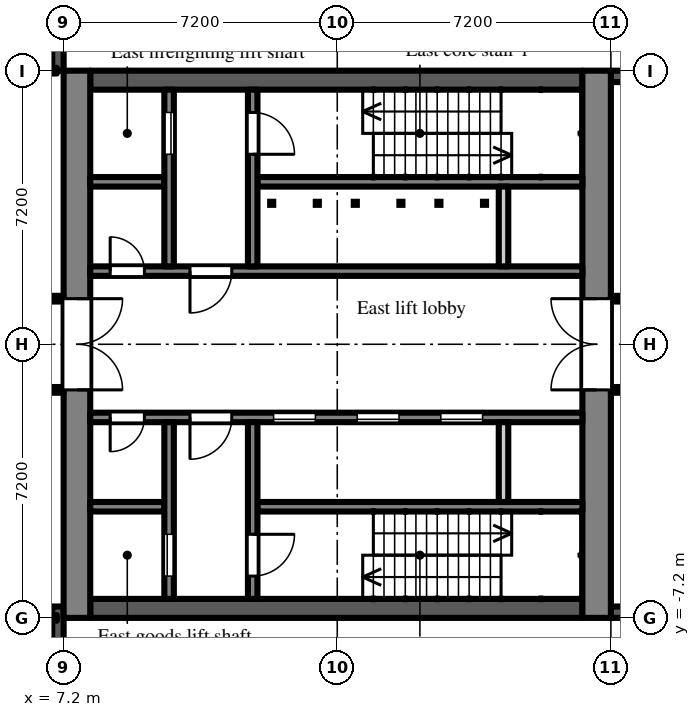
"""IFC4 building model, lengths in metres.
Left out: names, types, materials, properties, quantities, classifications, styles, units other than length and angle.
Written with IfcOpenShell. Run it as: python <this file> out.ifc"""

import sys

from ifc_helpers import new_model, si_unit, direction, frame, frame_2d, origin, place, context, subcontext, project, spatial, rectangle, extrude, element, fill, save


model = new_model("IFC4")
c1 = context("Model", 3, precision=1e-05, world=origin(), true_north=direction((0.0, 1.0)))
c2 = subcontext(c1, "Body", "Model", "MODEL_VIEW")
j1 = project(units=[si_unit("LENGTHUNIT", "METRE"), si_unit("PLANEANGLEUNIT", "RADIAN")], contexts=[c1])
p1 = place(None, origin())
s1 = spatial("IfcSite", under=j1, at=p1, CompositionType="ELEMENT")
p2 = place(p1, origin())
s2 = spatial("IfcBuilding", under=s1, at=p2, CompositionType="ELEMENT")
p3 = place(p2, frame((0.0, 0.0, 111.9)))
s3 = spatial("IfcBuildingStorey", under=s2, at=p3, CompositionType="ELEMENT", Elevation=111.9)
for number, where, z_axis, x_axis in (
    (1, (21.6, -7.05, 0.0), (0.0, 0.0, 1.0), (1.0, 0.0, 0.0)),
    (2, (24.3, 7.05, 0.0), (0.0, 0.0, 1.0), (-1.0, 0.0, 0.0)),
):
    element("IfcWall", number, at=place(p3, frame(where, z_axis=z_axis, x_axis=x_axis)), inside=s3, PredefinedType="SOLIDWALL", context=c2, shape_type="SweptSolid", body=[
        extrude(rectangle(XDim=2.7, YDim=0.3, at=frame_2d((1.35, 0.0))), origin(), (0.0, 0.0, 1.0), 3.4),
    ])
p4 = place(p3, frame((7.05, 7.2, 0.0), z_axis=(0.0, 0.0, 1.0), x_axis=(0.0, 1.0, 0.0)))
e3 = element("IfcWall", 3, at=p4, inside=s3, PredefinedType="SOLIDWALL", context=c2, shape_type="SweptSolid", body=[
    extrude(rectangle(XDim=7.2, YDim=0.3, at=frame_2d((3.6, 0.0))), origin(), (0.0, 0.0, 1.0), 3.8),
])
p5 = place(p3, frame((7.05, -14.4, 0.0), z_axis=(0.0, 0.0, 1.0), x_axis=(0.0, 1.0, 0.0)))
e4 = element("IfcWall", 4, at=p5, inside=s3, PredefinedType="SOLIDWALL", context=c2, shape_type="SweptSolid", body=[
    extrude(rectangle(XDim=7.5, YDim=0.3, at=frame_2d((3.75, 0.0))), origin(), (0.0, 0.0, 1.0), 3.8),
])
p6 = place(p3, frame((7.55, -7.2, 0.0), z_axis=(0.0, 0.0, 1.0), x_axis=(0.0, 1.0, 0.0)))
e5 = element("IfcWall", 5, at=p6, inside=s3, PredefinedType="SHEAR", context=c2, shape_type="SweptSolid", body=[
    extrude(rectangle(XDim=14.4, YDim=0.7, at=frame_2d((7.2, 0.0))), origin(), (0.0, 0.0, 1.0), 3.8),
])
p7 = place(p6, frame((6.0, 0.0, 0.0)))
e6 = element("IfcOpeningElement", 6, at=p7, cuts=e5, PredefinedType="OPENING", context=c2, shape_type="SweptSolid", body=[
    extrude(rectangle(XDim=2.4, YDim=2.2, at=frame_2d((1.2, 1.1))), frame((0.0, 0.36, 0.0), z_axis=(0.0, -1.0, 0.0), x_axis=(1.0, 0.0, 0.0)), (0.0, 0.0, 1.0), 0.72),
])
p8 = place(p3, frame((21.225, -7.2, 0.0), z_axis=(0.0, 0.0, 1.0), x_axis=(0.0, 1.0, 0.0)))
e7 = element("IfcWall", 7, at=p8, inside=s3, PredefinedType="SHEAR", context=c2, shape_type="SweptSolid", body=[
    extrude(rectangle(XDim=14.4, YDim=0.75, at=frame_2d((7.2, 0.0))), origin(), (0.0, 0.0, 1.0), 3.8),
])
p9 = place(p8, frame((6.0, 0.0, 0.0)))
e8 = element("IfcOpeningElement", 8, at=p9, cuts=e7, PredefinedType="OPENING", context=c2, shape_type="SweptSolid", body=[
    extrude(rectangle(XDim=2.4, YDim=2.2, at=frame_2d((1.2, 1.1))), frame((0.0, 0.385, 0.0), z_axis=(0.0, -1.0, 0.0), x_axis=(1.0, 0.0, 0.0)), (0.0, 0.0, 1.0), 0.77),
])
p10 = place(p3, frame((7.9, 6.95, 0.0), z_axis=(0.0, 0.0, 1.0), x_axis=(1.0, 0.0, 0.0)))
e9 = element("IfcWall", 9, at=p10, inside=s3, PredefinedType="SHEAR", context=c2, shape_type="SweptSolid", body=[
    extrude(rectangle(XDim=12.95, YDim=0.5, at=frame_2d((6.475, 0.0))), origin(), (0.0, 0.0, 1.0), 3.8),
])
p11 = place(p3, frame((7.9, 1.925, 0.0), z_axis=(0.0, 0.0, 1.0), x_axis=(1.0, 0.0, 0.0)))
e10 = element("IfcWall", 10, at=p11, inside=s3, PredefinedType="SHEAR", context=c2, shape_type="SweptSolid", body=[
    extrude(rectangle(XDim=12.95, YDim=0.25, at=frame_2d((6.475, 0.0))), origin(), (0.0, 0.0, 1.0), 3.8),
])
p12 = place(p11, frame((0.525, 0.0, 0.0)))
e11 = element("IfcOpeningElement", 11, at=p12, cuts=e10, PredefinedType="OPENING", context=c2, shape_type="SweptSolid", body=[
    extrude(rectangle(XDim=0.9, YDim=2.1, at=frame_2d((0.45, 1.05))), frame((0.0, 0.135, 0.0), z_axis=(0.0, -1.0, 0.0), x_axis=(1.0, 0.0, 0.0)), (0.0, 0.0, 1.0), 0.27),
])
p13 = place(p11, frame((2.625, 0.0, 0.0)))
e12 = element("IfcOpeningElement", 12, at=p13, cuts=e10, PredefinedType="OPENING", context=c2, shape_type="SweptSolid", body=[
    extrude(rectangle(XDim=1.1, YDim=2.1, at=frame_2d((0.55, 1.05))), frame((0.0, 0.135, 0.0), z_axis=(0.0, -1.0, 0.0), x_axis=(1.0, 0.0, 0.0)), (0.0, 0.0, 1.0), 0.27),
])
p14 = place(p3, frame((7.9, 4.275, 0.0), z_axis=(0.0, 0.0, 1.0), x_axis=(1.0, 0.0, 0.0)))
e13 = element("IfcWall", 13, at=p14, inside=s3, PredefinedType="SHEAR", context=c2, shape_type="SweptSolid", body=[
    extrude(rectangle(XDim=1.95, YDim=0.25, at=frame_2d((0.975, 0.0))), origin(), (0.0, 0.0, 1.0), 3.8),
])
p15 = place(p3, frame((12.3, 4.275, 0.0), z_axis=(0.0, 0.0, 1.0), x_axis=(1.0, 0.0, 0.0)))
e14 = element("IfcWall", 14, at=p15, inside=s3, PredefinedType="SHEAR", context=c2, shape_type="SweptSolid", body=[
    extrude(rectangle(XDim=8.55, YDim=0.25, at=frame_2d((4.275, 0.0))), origin(), (0.0, 0.0, 1.0), 3.8),
])
p16 = place(p3, frame((9.975, 2.05, 0.0), z_axis=(0.0, 0.0, 1.0), x_axis=(0.0, 1.0, 0.0)))
e15 = element("IfcWall", 15, at=p16, inside=s3, PredefinedType="SHEAR", context=c2, shape_type="SweptSolid", body=[
    extrude(rectangle(XDim=4.65, YDim=0.25, at=frame_2d((2.325, 0.0))), origin(), (0.0, 0.0, 1.0), 3.8),
])
p17 = place(p16, frame((2.95, 0.0, 0.0)))
e16 = element("IfcOpeningElement", 16, at=p17, cuts=e15, PredefinedType="OPENING", context=c2, shape_type="SweptSolid", body=[
    extrude(rectangle(XDim=1.1, YDim=2.1, at=frame_2d((0.55, 1.05))), frame((0.0, 0.135, 0.0), z_axis=(0.0, -1.0, 0.0), x_axis=(1.0, 0.0, 0.0)), (0.0, 0.0, 1.0), 0.27),
])
p18 = place(p3, frame((12.175, 2.05, 0.0), z_axis=(0.0, 0.0, 1.0), x_axis=(0.0, 1.0, 0.0)))
e17 = element("IfcWall", 17, at=p18, inside=s3, PredefinedType="SHEAR", context=c2, shape_type="SweptSolid", body=[
    extrude(rectangle(XDim=4.65, YDim=0.25, at=frame_2d((2.325, 0.0))), origin(), (0.0, 0.0, 1.0), 3.8),
])
p19 = place(p18, frame((2.95, 0.0, 0.0)))
e18 = element("IfcOpeningElement", 18, at=p19, cuts=e17, PredefinedType="OPENING", context=c2, shape_type="SweptSolid", body=[
    extrude(rectangle(XDim=1.1, YDim=2.1, at=frame_2d((0.55, 1.05))), frame((0.0, 0.135, 0.0), z_axis=(0.0, -1.0, 0.0), x_axis=(1.0, 0.0, 0.0)), (0.0, 0.0, 1.0), 0.27),
])
p20 = place(p3, frame((18.775, 2.05, 0.0), z_axis=(0.0, 0.0, 1.0), x_axis=(0.0, 1.0, 0.0)))
e19 = element("IfcWall", 19, at=p20, inside=s3, PredefinedType="PARTITIONING", context=c2, shape_type="SweptSolid", body=[
    extrude(rectangle(XDim=2.1, YDim=0.25, at=frame_2d((1.05, 0.0))), origin(), (0.0, 0.0, 1.0), 3.8),
])
p21 = place(p3, frame((7.9, -6.95, 0.0), z_axis=(0.0, 0.0, 1.0), x_axis=(1.0, 0.0, 0.0)))
e20 = element("IfcWall", 20, at=p21, inside=s3, PredefinedType="SHEAR", context=c2, shape_type="SweptSolid", body=[
    extrude(rectangle(XDim=12.95, YDim=0.5, at=frame_2d((6.475, 0.0))), origin(), (0.0, 0.0, 1.0), 3.8),
])
p22 = place(p3, frame((7.9, -1.925, 0.0), z_axis=(0.0, 0.0, 1.0), x_axis=(1.0, 0.0, 0.0)))
e21 = element("IfcWall", 21, at=p22, inside=s3, PredefinedType="SHEAR", context=c2, shape_type="SweptSolid", body=[
    extrude(rectangle(XDim=12.95, YDim=0.25, at=frame_2d((6.475, 0.0))), origin(), (0.0, 0.0, 1.0), 3.8),
])
p23 = place(p22, frame((4.825, 0.0, 0.0)))
e22 = element("IfcOpeningElement", 22, at=p23, cuts=e21, PredefinedType="OPENING", context=c2, shape_type="SweptSolid", body=[
    extrude(rectangle(XDim=1.1, YDim=2.1, at=frame_2d((0.55, 1.05))), frame((0.0, 0.135, 0.0), z_axis=(0.0, -1.0, 0.0), x_axis=(1.0, 0.0, 0.0)), (0.0, 0.0, 1.0), 0.27),
])
p24 = place(p22, frame((7.025, 0.0, 0.0)))
e23 = element("IfcOpeningElement", 23, at=p24, cuts=e21, PredefinedType="OPENING", context=c2, shape_type="SweptSolid", body=[
    extrude(rectangle(XDim=1.1, YDim=2.1, at=frame_2d((0.55, 1.05))), frame((0.0, 0.135, 0.0), z_axis=(0.0, -1.0, 0.0), x_axis=(1.0, 0.0, 0.0)), (0.0, 0.0, 1.0), 0.27),
])
p25 = place(p22, frame((9.225, 0.0, 0.0)))
e24 = element("IfcOpeningElement", 24, at=p25, cuts=e21, PredefinedType="OPENING", context=c2, shape_type="SweptSolid", body=[
    extrude(rectangle(XDim=1.1, YDim=2.1, at=frame_2d((0.55, 1.05))), frame((0.0, 0.135, 0.0), z_axis=(0.0, -1.0, 0.0), x_axis=(1.0, 0.0, 0.0)), (0.0, 0.0, 1.0), 0.27),
])
p26 = place(p22, frame((0.525, 0.0, 0.0)))
e25 = element("IfcOpeningElement", 25, at=p26, cuts=e21, PredefinedType="OPENING", context=c2, shape_type="SweptSolid", body=[
    extrude(rectangle(XDim=0.9, YDim=2.1, at=frame_2d((0.45, 1.05))), frame((0.0, 0.135, 0.0), z_axis=(0.0, -1.0, 0.0), x_axis=(1.0, 0.0, 0.0)), (0.0, 0.0, 1.0), 0.27),
])
p27 = place(p22, frame((2.625, 0.0, 0.0)))
e26 = element("IfcOpeningElement", 26, at=p27, cuts=e21, PredefinedType="OPENING", context=c2, shape_type="SweptSolid", body=[
    extrude(rectangle(XDim=1.1, YDim=2.1, at=frame_2d((0.55, 1.05))), frame((0.0, 0.135, 0.0), z_axis=(0.0, -1.0, 0.0), x_axis=(1.0, 0.0, 0.0)), (0.0, 0.0, 1.0), 0.27),
])
p28 = place(p3, frame((7.9, -4.275, 0.0), z_axis=(0.0, 0.0, 1.0), x_axis=(1.0, 0.0, 0.0)))
e27 = element("IfcWall", 27, at=p28, inside=s3, PredefinedType="SHEAR", context=c2, shape_type="SweptSolid", body=[
    extrude(rectangle(XDim=1.95, YDim=0.25, at=frame_2d((0.975, 0.0))), origin(), (0.0, 0.0, 1.0), 3.8),
])
p29 = place(p3, frame((12.3, -4.275, 0.0), z_axis=(0.0, 0.0, 1.0), x_axis=(1.0, 0.0, 0.0)))
e28 = element("IfcWall", 28, at=p29, inside=s3, PredefinedType="SHEAR", context=c2, shape_type="SweptSolid", body=[
    extrude(rectangle(XDim=8.55, YDim=0.25, at=frame_2d((4.275, 0.0))), origin(), (0.0, 0.0, 1.0), 3.8),
])
p30 = place(p3, frame((9.975, -2.05, 0.0), z_axis=(0.0, 0.0, 1.0), x_axis=(0.0, -1.0, 0.0)))
e29 = element("IfcWall", 29, at=p30, inside=s3, PredefinedType="SHEAR", context=c2, shape_type="SweptSolid", body=[
    extrude(rectangle(XDim=4.65, YDim=0.25, at=frame_2d((2.325, 0.0))), origin(), (0.0, 0.0, 1.0), 3.8),
])
p31 = place(p30, frame((2.95, 0.0, 0.0)))
e30 = element("IfcOpeningElement", 30, at=p31, cuts=e29, PredefinedType="OPENING", context=c2, shape_type="SweptSolid", body=[
    extrude(rectangle(XDim=1.1, YDim=2.1, at=frame_2d((0.55, 1.05))), frame((0.0, 0.135, 0.0), z_axis=(0.0, -1.0, 0.0), x_axis=(1.0, 0.0, 0.0)), (0.0, 0.0, 1.0), 0.27),
])
p32 = place(p3, frame((12.175, -2.05, 0.0), z_axis=(0.0, 0.0, 1.0), x_axis=(0.0, -1.0, 0.0)))
e31 = element("IfcWall", 31, at=p32, inside=s3, PredefinedType="SHEAR", context=c2, shape_type="SweptSolid", body=[
    extrude(rectangle(XDim=4.65, YDim=0.25, at=frame_2d((2.325, 0.0))), origin(), (0.0, 0.0, 1.0), 3.8),
])
p33 = place(p32, frame((2.95, 0.0, 0.0)))
e32 = element("IfcOpeningElement", 32, at=p33, cuts=e31, PredefinedType="OPENING", context=c2, shape_type="SweptSolid", body=[
    extrude(rectangle(XDim=1.1, YDim=2.1, at=frame_2d((0.55, 1.05))), frame((0.0, 0.135, 0.0), z_axis=(0.0, -1.0, 0.0), x_axis=(1.0, 0.0, 0.0)), (0.0, 0.0, 1.0), 0.27),
])
p34 = place(p3, frame((18.775, -2.05, 0.0), z_axis=(0.0, 0.0, 1.0), x_axis=(0.0, -1.0, 0.0)))
e33 = element("IfcWall", 33, at=p34, inside=s3, PredefinedType="PARTITIONING", context=c2, shape_type="SweptSolid", body=[
    extrude(rectangle(XDim=2.1, YDim=0.25, at=frame_2d((1.05, 0.0))), origin(), (0.0, 0.0, 1.0), 3.8),
])
p35 = place(p3, frame((1.275, -1.2, 0.0), z_axis=(0.0, 0.0, 1.0), x_axis=(1.0, 0.0, 0.0)))
e34 = element("IfcWall", 34, at=p35, inside=s3, PredefinedType="PARTITIONING", context=c2, shape_type="SweptSolid", body=[
    extrude(rectangle(XDim=5.925, YDim=0.15, at=frame_2d((2.962, 0.0))), origin(), (0.0, 0.0, 1.0), 3.8),
])
p36 = place(p35, frame((0.1, 0.0, 0.0)))
e35 = element("IfcOpeningElement", 35, at=p36, cuts=e34, PredefinedType="OPENING", context=c2, shape_type="SweptSolid", body=[
    extrude(rectangle(XDim=0.9, YDim=2.1, at=frame_2d((0.45, 1.05))), frame((0.0, 0.085, 0.0), z_axis=(0.0, -1.0, 0.0), x_axis=(1.0, 0.0, 0.0)), (0.0, 0.0, 1.0), 0.17),
])
p37 = place(p35, frame((4.075, 0.0, 0.0)))
e36 = element("IfcOpeningElement", 36, at=p37, cuts=e34, PredefinedType="OPENING", context=c2, shape_type="SweptSolid", body=[
    extrude(rectangle(XDim=1.2, YDim=2.1, at=frame_2d((0.6, 1.05))), frame((0.0, 0.085, 0.0), z_axis=(0.0, -1.0, 0.0), x_axis=(1.0, 0.0, 0.0)), (0.0, 0.0, 1.0), 0.17),
])
p38 = place(p3, frame((1.275, 1.2, 0.0), z_axis=(0.0, 0.0, 1.0), x_axis=(1.0, 0.0, 0.0)))
e37 = element("IfcWall", 37, at=p38, inside=s3, PredefinedType="PARTITIONING", context=c2, shape_type="SweptSolid", body=[
    extrude(rectangle(XDim=5.925, YDim=0.15, at=frame_2d((2.962, 0.0))), origin(), (0.0, 0.0, 1.0), 3.8),
])
p39 = place(p38, frame((3.875, 0.0, 0.0)))
e38 = element("IfcOpeningElement", 38, at=p39, cuts=e37, PredefinedType="OPENING", context=c2, shape_type="SweptSolid", body=[
    extrude(rectangle(XDim=1.2, YDim=2.1, at=frame_2d((0.6, 1.05))), frame((0.0, 0.085, 0.0), z_axis=(0.0, -1.0, 0.0), x_axis=(1.0, 0.0, 0.0)), (0.0, 0.0, 1.0), 0.17),
])
p40 = place(p3, frame((21.6, -1.2, 0.0), z_axis=(0.0, 0.0, 1.0), x_axis=(1.0, 0.0, 0.0)))
e39 = element("IfcWall", 39, at=p40, inside=s3, PredefinedType="PARTITIONING", context=c2, shape_type="SweptSolid", body=[
    extrude(rectangle(XDim=14.9, YDim=0.15, at=frame_2d((7.45, 0.0))), origin(), (0.0, 0.0, 1.0), 3.8),
])
p41 = place(p40, frame((2.7, 0.0, 0.0)))
e40 = element("IfcOpeningElement", 40, at=p41, cuts=e39, PredefinedType="OPENING", context=c2, shape_type="SweptSolid", body=[
    extrude(rectangle(XDim=1.8, YDim=2.1, at=frame_2d((0.9, 1.05))), frame((0.0, 0.085, 0.0), z_axis=(0.0, -1.0, 0.0), x_axis=(1.0, 0.0, 0.0)), (0.0, 0.0, 1.0), 0.17),
])
p42 = place(p40, frame((10.15, 0.0, 0.0)))
e41 = element("IfcOpeningElement", 41, at=p42, cuts=e39, PredefinedType="OPENING", context=c2, shape_type="SweptSolid", body=[
    extrude(rectangle(XDim=1.8, YDim=2.1, at=frame_2d((0.9, 1.05))), frame((0.0, 0.085, 0.0), z_axis=(0.0, -1.0, 0.0), x_axis=(1.0, 0.0, 0.0)), (0.0, 0.0, 1.0), 0.17),
])
p43 = place(p3, frame((21.6, 1.2, 0.0), z_axis=(0.0, 0.0, 1.0), x_axis=(1.0, 0.0, 0.0)))
e42 = element("IfcWall", 42, at=p43, inside=s3, PredefinedType="PARTITIONING", context=c2, shape_type="SweptSolid", body=[
    extrude(rectangle(XDim=14.9, YDim=0.15, at=frame_2d((7.45, 0.0))), origin(), (0.0, 0.0, 1.0), 3.8),
])
p44 = place(p43, frame((3.0, 0.0, 0.0)))
e43 = element("IfcOpeningElement", 43, at=p44, cuts=e42, PredefinedType="OPENING", context=c2, shape_type="SweptSolid", body=[
    extrude(rectangle(XDim=1.2, YDim=2.1, at=frame_2d((0.6, 1.05))), frame((0.0, 0.085, 0.0), z_axis=(0.0, -1.0, 0.0), x_axis=(1.0, 0.0, 0.0)), (0.0, 0.0, 1.0), 0.17),
])
p45 = place(p43, frame((10.15, 0.0, 0.0)))
e44 = element("IfcOpeningElement", 44, at=p45, cuts=e42, PredefinedType="OPENING", context=c2, shape_type="SweptSolid", body=[
    extrude(rectangle(XDim=1.8, YDim=2.1, at=frame_2d((0.9, 1.05))), frame((0.0, 0.085, 0.0), z_axis=(0.0, -1.0, 0.0), x_axis=(1.0, 0.0, 0.0)), (0.0, 0.0, 1.0), 0.17),
])
for number, where, z_axis, x_axis in (
    (45, (3.75, -7.2, 0.0), (0.0, 0.0, 1.0), (1.0, 0.0, 0.0)),
    (46, (3.75, 7.2, 0.0), (0.0, 0.0, 1.0), (1.0, 0.0, 0.0)),
):
    element("IfcWall", number, at=place(p3, frame(where, z_axis=z_axis, x_axis=x_axis)), inside=s3, PredefinedType="PARTITIONING", context=c2, shape_type="SweptSolid", body=[
        extrude(rectangle(XDim=3.27, YDim=0.15, at=frame_2d((1.635, 0.0))), origin(), (0.0, 0.0, 1.0), 3.4),
    ])
p46 = place(p23, origin())
e47 = element("IfcDoor", 47, at=p46, inside=s3, OperationType="SLIDING_TO_LEFT", PredefinedType="DOOR", context=c2, shape_type="SweptSolid", body=[
    extrude(rectangle(XDim=1.1, YDim=2.1, at=frame_2d((0.55, 1.05))), frame((0.0, 0.025, 0.0), z_axis=(0.0, -1.0, 0.0), x_axis=(1.0, 0.0, 0.0)), (0.0, 0.0, 1.0), 0.05),
])
fill(e22, e47)
p47 = place(p24, origin())
e48 = element("IfcDoor", 48, at=p47, inside=s3, OperationType="SLIDING_TO_LEFT", PredefinedType="DOOR", context=c2, shape_type="SweptSolid", body=[
    extrude(rectangle(XDim=1.1, YDim=2.1, at=frame_2d((0.55, 1.05))), frame((0.0, 0.025, 0.0), z_axis=(0.0, -1.0, 0.0), x_axis=(1.0, 0.0, 0.0)), (0.0, 0.0, 1.0), 0.05),
])
fill(e23, e48)
p48 = place(p25, origin())
e49 = element("IfcDoor", 49, at=p48, inside=s3, OperationType="SLIDING_TO_LEFT", PredefinedType="DOOR", context=c2, shape_type="SweptSolid", body=[
    extrude(rectangle(XDim=1.1, YDim=2.1, at=frame_2d((0.55, 1.05))), frame((0.0, 0.025, 0.0), z_axis=(0.0, -1.0, 0.0), x_axis=(1.0, 0.0, 0.0)), (0.0, 0.0, 1.0), 0.05),
])
fill(e24, e49)
p49 = place(p17, origin())
e50 = element("IfcDoor", 50, at=p49, inside=s3, OperationType="SLIDING_TO_LEFT", PredefinedType="DOOR", context=c2, shape_type="SweptSolid", body=[
    extrude(rectangle(XDim=1.1, YDim=2.1, at=frame_2d((0.55, 1.05))), frame((0.0, 0.025, 0.0), z_axis=(0.0, -1.0, 0.0), x_axis=(1.0, 0.0, 0.0)), (0.0, 0.0, 1.0), 0.05),
])
fill(e16, e50)
p50 = place(p31, origin())
e51 = element("IfcDoor", 51, at=p50, inside=s3, OperationType="SLIDING_TO_LEFT", PredefinedType="DOOR", context=c2, shape_type="SweptSolid", body=[
    extrude(rectangle(XDim=1.1, YDim=2.1, at=frame_2d((0.55, 1.05))), frame((0.0, 0.025, 0.0), z_axis=(0.0, -1.0, 0.0), x_axis=(1.0, 0.0, 0.0)), (0.0, 0.0, 1.0), 0.05),
])
fill(e30, e51)
p51 = place(p19, frame((1.1, 0.0, 0.0), z_axis=(0.0, 0.0, 1.0), x_axis=(-1.0, 0.0, 0.0)))
e52 = element("IfcDoor", 52, at=p51, inside=s3, OperationType="SINGLE_SWING_RIGHT", PredefinedType="DOOR", context=c2, shape_type="SweptSolid", body=[
    extrude(rectangle(XDim=1.1, YDim=2.1, at=frame_2d((0.55, 1.05))), frame((0.0, 0.025, 0.0), z_axis=(0.0, -1.0, 0.0), x_axis=(1.0, 0.0, 0.0)), (0.0, 0.0, 1.0), 0.05),
])
fill(e18, e52)
p52 = place(p33, origin())
e53 = element("IfcDoor", 53, at=p52, inside=s3, OperationType="SINGLE_SWING_LEFT", PredefinedType="DOOR", context=c2, shape_type="SweptSolid", body=[
    extrude(rectangle(XDim=1.1, YDim=2.1, at=frame_2d((0.55, 1.05))), frame((0.0, 0.025, 0.0), z_axis=(0.0, -1.0, 0.0), x_axis=(1.0, 0.0, 0.0)), (0.0, 0.0, 1.0), 0.05),
])
fill(e32, e53)
p53 = place(p12, origin())
e54 = element("IfcDoor", 54, at=p53, inside=s3, OperationType="SINGLE_SWING_LEFT", PredefinedType="DOOR", context=c2, shape_type="SweptSolid", body=[
    extrude(rectangle(XDim=0.9, YDim=2.1, at=frame_2d((0.45, 1.05))), frame((0.0, 0.025, 0.0), z_axis=(0.0, -1.0, 0.0), x_axis=(1.0, 0.0, 0.0)), (0.0, 0.0, 1.0), 0.05),
])
fill(e11, e54)
p54 = place(p26, frame((0.9, 0.0, 0.0), z_axis=(0.0, 0.0, 1.0), x_axis=(-1.0, 0.0, 0.0)))
e55 = element("IfcDoor", 55, at=p54, inside=s3, OperationType="SINGLE_SWING_RIGHT", PredefinedType="DOOR", context=c2, shape_type="SweptSolid", body=[
    extrude(rectangle(XDim=0.9, YDim=2.1, at=frame_2d((0.45, 1.05))), frame((0.0, 0.025, 0.0), z_axis=(0.0, -1.0, 0.0), x_axis=(1.0, 0.0, 0.0)), (0.0, 0.0, 1.0), 0.05),
])
fill(e25, e55)
p55 = place(p13, frame((1.1, 0.0, 0.0), z_axis=(0.0, 0.0, 1.0), x_axis=(-1.0, 0.0, 0.0)))
e56 = element("IfcDoor", 56, at=p55, inside=s3, OperationType="SINGLE_SWING_RIGHT", PredefinedType="DOOR", context=c2, shape_type="SweptSolid", body=[
    extrude(rectangle(XDim=1.1, YDim=2.1, at=frame_2d((0.55, 1.05))), frame((0.0, 0.025, 0.0), z_axis=(0.0, -1.0, 0.0), x_axis=(1.0, 0.0, 0.0)), (0.0, 0.0, 1.0), 0.05),
])
fill(e12, e56)
p56 = place(p27, frame((1.1, 0.0, 0.0), z_axis=(0.0, 0.0, 1.0), x_axis=(-1.0, 0.0, 0.0)))
e57 = element("IfcDoor", 57, at=p56, inside=s3, OperationType="SINGLE_SWING_RIGHT", PredefinedType="DOOR", context=c2, shape_type="SweptSolid", body=[
    extrude(rectangle(XDim=1.1, YDim=2.1, at=frame_2d((0.55, 1.05))), frame((0.0, 0.025, 0.0), z_axis=(0.0, -1.0, 0.0), x_axis=(1.0, 0.0, 0.0)), (0.0, 0.0, 1.0), 0.05),
])
fill(e26, e57)
p57 = place(p7, frame((2.4, 0.0, 0.0), z_axis=(0.0, 0.0, 1.0), x_axis=(-1.0, 0.0, 0.0)))
e58 = element("IfcDoor", 58, at=p57, inside=s3, OperationType="DOUBLE_DOOR_DOUBLE_SWING", PredefinedType="DOOR", context=c2, shape_type="SweptSolid", body=[
    extrude(rectangle(XDim=2.4, YDim=2.2, at=frame_2d((1.2, 1.1))), frame((0.0, 0.025, 0.0), z_axis=(0.0, -1.0, 0.0), x_axis=(1.0, 0.0, 0.0)), (0.0, 0.0, 1.0), 0.05),
])
fill(e6, e58)
p58 = place(p9, origin())
e59 = element("IfcDoor", 59, at=p58, inside=s3, OperationType="DOUBLE_DOOR_DOUBLE_SWING", PredefinedType="DOOR", context=c2, shape_type="SweptSolid", body=[
    extrude(rectangle(XDim=2.4, YDim=2.2, at=frame_2d((1.2, 1.1))), frame((0.0, 0.025, 0.0), z_axis=(0.0, -1.0, 0.0), x_axis=(1.0, 0.0, 0.0)), (0.0, 0.0, 1.0), 0.05),
])
fill(e8, e59)
save(model, sys.argv[1])
